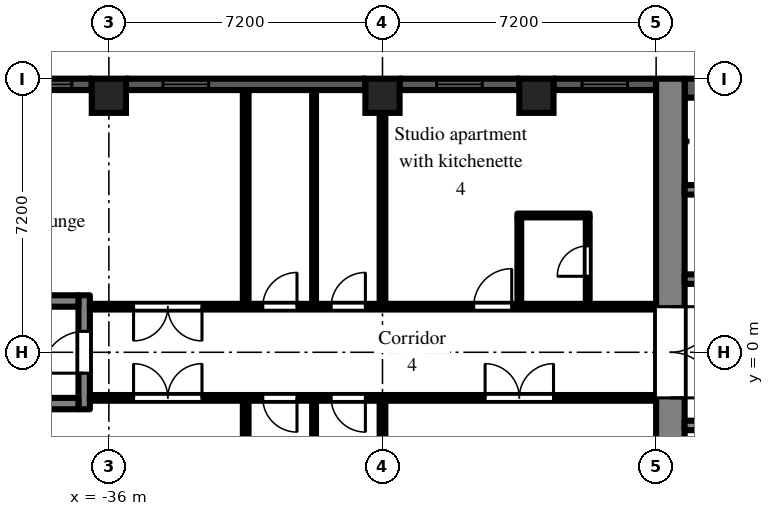
"""IFC4 building model, lengths in metres.
Left out: names, types, materials, properties, quantities, classifications, styles, units other than length and angle.
Written with IfcOpenShell. Run it as: python <this file> out.ifc"""

import sys

from ifc_helpers import new_model, si_unit, direction, frame, frame_2d, origin, origin_2d, place, context, subcontext, project, spatial, rectangle, extrude, element, fill, save


model = new_model("IFC4")
c1 = context("Model", 3, precision=1e-05, world=origin(), true_north=direction((0.0, 1.0)))
c2 = subcontext(c1, "Body", "Model", "MODEL_VIEW")
j1 = project(units=[si_unit("LENGTHUNIT", "METRE"), si_unit("PLANEANGLEUNIT", "RADIAN")], contexts=[c1])
p1 = place(None, origin())
s1 = spatial("IfcSite", under=j1, at=p1, CompositionType="ELEMENT")
p2 = place(p1, origin())
s2 = spatial("IfcBuilding", under=s1, at=p2, CompositionType="ELEMENT")
p3 = place(p2, frame((0.0, 0.0, 108.9)))
s3 = spatial("IfcBuildingStorey", under=s2, at=p3, CompositionType="ELEMENT", Elevation=108.9)
for number, where, z_axis, x_axis in (
    (1, (-36.0, 6.75, 0.0), (0.0, 0.0, 1.0), (1.0, 0.0, 0.0)),
    (2, (-28.8, 6.75, 0.0), (0.0, 0.0, 1.0), (1.0, 0.0, 0.0)),
    (3, (-24.75, 6.75, 0.0), (0.0, 0.0, 1.0), (1.0, 0.0, 0.0)),
):
    element("IfcColumn", number, at=place(p3, frame(where, z_axis=z_axis, x_axis=x_axis)), inside=s3, PredefinedType="COLUMN", context=c2, shape_type="SweptSolid", body=[
        extrude(rectangle(XDim=0.9, YDim=0.9, at=origin_2d()), origin(), (0.0, 0.0, 1.0), 3.0),
    ])
p4 = place(p3, frame((-21.6, 7.05, 0.0), z_axis=(0.0, 0.0, 1.0), x_axis=(-1.0, 0.0, 0.0)))
e4 = element("IfcWall", 4, at=p4, inside=s3, PredefinedType="SOLIDWALL", context=c2, shape_type="SweptSolid", body=[
    extrude(rectangle(XDim=2.7, YDim=0.3, at=frame_2d((1.35, 0.0))), origin(), (0.0, 0.0, 1.0), 2.2),
])
p5 = place(p4, frame((0.75, 0.0, 0.2)))
e5 = element("IfcOpeningElement", 5, at=p5, cuts=e4, PredefinedType="OPENING", context=c2, shape_type="SweptSolid", body=[
    extrude(rectangle(XDim=1.2, YDim=1.85, at=frame_2d((0.6, 0.925))), frame((0.0, 0.16, 0.0), z_axis=(0.0, -1.0, 0.0), x_axis=(1.0, 0.0, 0.0)), (0.0, 0.0, 1.0), 0.32),
])
p6 = place(p3, frame((-25.2, 7.05, 0.0), z_axis=(0.0, 0.0, 1.0), x_axis=(-1.0, 0.0, 0.0)))
e6 = element("IfcWall", 6, at=p6, inside=s3, PredefinedType="SOLIDWALL", context=c2, shape_type="SweptSolid", body=[
    extrude(rectangle(XDim=3.15, YDim=0.3, at=frame_2d((1.575, 0.0))), origin(), (0.0, 0.0, 1.0), 2.2),
])
p7 = place(p6, frame((0.975, 0.0, 0.2)))
e7 = element("IfcOpeningElement", 7, at=p7, cuts=e6, PredefinedType="OPENING", context=c2, shape_type="SweptSolid", body=[
    extrude(rectangle(XDim=1.2, YDim=1.85, at=frame_2d((0.6, 0.925))), frame((0.0, 0.16, 0.0), z_axis=(0.0, -1.0, 0.0), x_axis=(1.0, 0.0, 0.0)), (0.0, 0.0, 1.0), 0.32),
])
p8 = place(p3, frame((-29.25, 7.05, 0.0), z_axis=(0.0, 0.0, 1.0), x_axis=(-1.0, 0.0, 0.0)))
e8 = element("IfcWall", 8, at=p8, inside=s3, PredefinedType="SOLIDWALL", context=c2, shape_type="SweptSolid", body=[
    extrude(rectangle(XDim=6.3, YDim=0.3, at=frame_2d((3.15, 0.0))), origin(), (0.0, 0.0, 1.0), 2.2),
])
p9 = place(p8, frame((4.125, 0.0, 0.2)))
e9 = element("IfcOpeningElement", 9, at=p9, cuts=e8, PredefinedType="OPENING", context=c2, shape_type="SweptSolid", body=[
    extrude(rectangle(XDim=1.2, YDim=1.85, at=frame_2d((0.6, 0.925))), frame((0.0, 0.16, 0.0), z_axis=(0.0, -1.0, 0.0), x_axis=(1.0, 0.0, 0.0)), (0.0, 0.0, 1.0), 0.32),
])
p10 = place(p3, frame((-36.45, 7.05, 0.0), z_axis=(0.0, 0.0, 1.0), x_axis=(-1.0, 0.0, 0.0)))
e10 = element("IfcWall", 10, at=p10, inside=s3, PredefinedType="SOLIDWALL", context=c2, shape_type="SweptSolid", body=[
    extrude(rectangle(XDim=2.25, YDim=0.3, at=frame_2d((1.125, 0.0))), origin(), (0.0, 0.0, 1.0), 2.2),
])
p11 = place(p10, frame((0.525, 0.0, 0.2)))
e11 = element("IfcOpeningElement", 11, at=p11, cuts=e10, PredefinedType="OPENING", context=c2, shape_type="SweptSolid", body=[
    extrude(rectangle(XDim=1.2, YDim=1.85, at=frame_2d((0.6, 0.925))), frame((0.0, 0.16, 0.0), z_axis=(0.0, -1.0, 0.0), x_axis=(1.0, 0.0, 0.0)), (0.0, 0.0, 1.0), 0.32),
])
p12 = place(p3, frame((-21.225, -7.2, 0.0), z_axis=(0.0, 0.0, 1.0), x_axis=(0.0, 1.0, 0.0)))
e12 = element("IfcWall", 12, at=p12, inside=s3, PredefinedType="SHEAR", context=c2, shape_type="SweptSolid", body=[
    extrude(rectangle(XDim=14.4, YDim=0.75, at=frame_2d((7.2, 0.0))), origin(), (0.0, 0.0, 1.0), 2.55),
])
p13 = place(p12, frame((6.0, 0.0, 0.0)))
e13 = element("IfcOpeningElement", 13, at=p13, cuts=e12, PredefinedType="OPENING", context=c2, shape_type="SweptSolid", body=[
    extrude(rectangle(XDim=2.4, YDim=2.2, at=frame_2d((1.2, 1.1))), frame((0.0, 0.385, 0.0), z_axis=(0.0, -1.0, 0.0), x_axis=(1.0, 0.0, 0.0)), (0.0, 0.0, 1.0), 0.77),
])
p14 = place(p3, frame((-7.9, 6.95, 0.0), z_axis=(0.0, 0.0, 1.0), x_axis=(-1.0, 0.0, 0.0)))
e14 = element("IfcWall", 14, at=p14, inside=s3, PredefinedType="SHEAR", context=c2, shape_type="SweptSolid", body=[
    extrude(rectangle(XDim=12.95, YDim=0.5, at=frame_2d((6.475, 0.0))), origin(), (0.0, 0.0, 1.0), 2.55),
])
p15 = place(p3, frame((-7.9, 1.925, 0.0), z_axis=(0.0, 0.0, 1.0), x_axis=(-1.0, 0.0, 0.0)))
e15 = element("IfcWall", 15, at=p15, inside=s3, PredefinedType="SHEAR", context=c2, shape_type="SweptSolid", body=[
    extrude(rectangle(XDim=12.95, YDim=0.25, at=frame_2d((6.475, 0.0))), origin(), (0.0, 0.0, 1.0), 2.55),
])
p16 = place(p15, frame((0.525, 0.0, 0.0)))
e16 = element("IfcOpeningElement", 16, at=p16, cuts=e15, PredefinedType="OPENING", context=c2, shape_type="SweptSolid", body=[
    extrude(rectangle(XDim=0.9, YDim=2.1, at=frame_2d((0.45, 1.05))), frame((0.0, 0.135, 0.0), z_axis=(0.0, -1.0, 0.0), x_axis=(1.0, 0.0, 0.0)), (0.0, 0.0, 1.0), 0.27),
])
p17 = place(p15, frame((2.625, 0.0, 0.0)))
e17 = element("IfcOpeningElement", 17, at=p17, cuts=e15, PredefinedType="OPENING", context=c2, shape_type="SweptSolid", body=[
    extrude(rectangle(XDim=1.1, YDim=2.1, at=frame_2d((0.55, 1.05))), frame((0.0, 0.135, 0.0), z_axis=(0.0, -1.0, 0.0), x_axis=(1.0, 0.0, 0.0)), (0.0, 0.0, 1.0), 0.27),
])
p18 = place(p15, frame((4.925, 0.0, 0.0)))
e18 = element("IfcOpeningElement", 18, at=p18, cuts=e15, PredefinedType="OPENING", context=c2, shape_type="SweptSolid", body=[
    extrude(rectangle(XDim=0.9, YDim=2.1, at=frame_2d((0.45, 1.05))), frame((0.0, 0.135, 0.0), z_axis=(0.0, -1.0, 0.0), x_axis=(1.0, 0.0, 0.0)), (0.0, 0.0, 1.0), 0.27),
])
p19 = place(p15, frame((8.225, 0.0, 0.0)))
e19 = element("IfcOpeningElement", 19, at=p19, cuts=e15, PredefinedType="OPENING", context=c2, shape_type="SweptSolid", body=[
    extrude(rectangle(XDim=0.9, YDim=2.1, at=frame_2d((0.45, 1.05))), frame((0.0, 0.135, 0.0), z_axis=(0.0, -1.0, 0.0), x_axis=(1.0, 0.0, 0.0)), (0.0, 0.0, 1.0), 0.27),
])
p20 = place(p3, frame((-12.3, 4.275, 0.0), z_axis=(0.0, 0.0, 1.0), x_axis=(-1.0, 0.0, 0.0)))
e20 = element("IfcWall", 20, at=p20, inside=s3, PredefinedType="SHEAR", context=c2, shape_type="SweptSolid", body=[
    extrude(rectangle(XDim=8.55, YDim=0.25, at=frame_2d((4.275, 0.0))), origin(), (0.0, 0.0, 1.0), 2.55),
])
p21 = place(p3, frame((-7.9, -1.925, 0.0), z_axis=(0.0, 0.0, 1.0), x_axis=(-1.0, 0.0, 0.0)))
e21 = element("IfcWall", 21, at=p21, inside=s3, PredefinedType="SHEAR", context=c2, shape_type="SweptSolid", body=[
    extrude(rectangle(XDim=12.95, YDim=0.25, at=frame_2d((6.475, 0.0))), origin(), (0.0, 0.0, 1.0), 2.55),
])
p22 = place(p21, frame((4.825, 0.0, 0.0)))
e22 = element("IfcOpeningElement", 22, at=p22, cuts=e21, PredefinedType="OPENING", context=c2, shape_type="SweptSolid", body=[
    extrude(rectangle(XDim=1.1, YDim=2.1, at=frame_2d((0.55, 1.05))), frame((0.0, 0.135, 0.0), z_axis=(0.0, -1.0, 0.0), x_axis=(1.0, 0.0, 0.0)), (0.0, 0.0, 1.0), 0.27),
])
p23 = place(p21, frame((7.025, 0.0, 0.0)))
e23 = element("IfcOpeningElement", 23, at=p23, cuts=e21, PredefinedType="OPENING", context=c2, shape_type="SweptSolid", body=[
    extrude(rectangle(XDim=1.1, YDim=2.1, at=frame_2d((0.55, 1.05))), frame((0.0, 0.135, 0.0), z_axis=(0.0, -1.0, 0.0), x_axis=(1.0, 0.0, 0.0)), (0.0, 0.0, 1.0), 0.27),
])
p24 = place(p21, frame((9.225, 0.0, 0.0)))
e24 = element("IfcOpeningElement", 24, at=p24, cuts=e21, PredefinedType="OPENING", context=c2, shape_type="SweptSolid", body=[
    extrude(rectangle(XDim=1.1, YDim=2.1, at=frame_2d((0.55, 1.05))), frame((0.0, 0.135, 0.0), z_axis=(0.0, -1.0, 0.0), x_axis=(1.0, 0.0, 0.0)), (0.0, 0.0, 1.0), 0.27),
])
p25 = place(p21, frame((0.525, 0.0, 0.0)))
e25 = element("IfcOpeningElement", 25, at=p25, cuts=e21, PredefinedType="OPENING", context=c2, shape_type="SweptSolid", body=[
    extrude(rectangle(XDim=0.9, YDim=2.1, at=frame_2d((0.45, 1.05))), frame((0.0, 0.135, 0.0), z_axis=(0.0, -1.0, 0.0), x_axis=(1.0, 0.0, 0.0)), (0.0, 0.0, 1.0), 0.27),
])
p26 = place(p21, frame((2.625, 0.0, 0.0)))
e26 = element("IfcOpeningElement", 26, at=p26, cuts=e21, PredefinedType="OPENING", context=c2, shape_type="SweptSolid", body=[
    extrude(rectangle(XDim=1.1, YDim=2.1, at=frame_2d((0.55, 1.05))), frame((0.0, 0.135, 0.0), z_axis=(0.0, -1.0, 0.0), x_axis=(1.0, 0.0, 0.0)), (0.0, 0.0, 1.0), 0.27),
])
p27 = place(p3, frame((-36.65, -1.5, 0.0), z_axis=(0.0, 0.0, 1.0), x_axis=(0.0, 1.0, 0.0)))
e27 = element("IfcWall", 27, at=p27, inside=s3, PredefinedType="SHEAR", context=c2, shape_type="SweptSolid", body=[
    extrude(rectangle(XDim=3.0, YDim=0.3, at=frame_2d((1.5, 0.0))), origin(), (0.0, 0.0, 1.0), 2.55),
])
p28 = place(p27, frame((0.95, 0.0, 0.0)))
e28 = element("IfcOpeningElement", 28, at=p28, cuts=e27, PredefinedType="OPENING", context=c2, shape_type="SweptSolid", body=[
    extrude(rectangle(XDim=1.1, YDim=2.1, at=frame_2d((0.55, 1.05))), frame((0.0, 0.16, 0.0), z_axis=(0.0, -1.0, 0.0), x_axis=(1.0, 0.0, 0.0)), (0.0, 0.0, 1.0), 0.32),
])
for number, where, z_axis, x_axis in (
    (29, (-36.8, -1.35, 0.0), (0.0, 0.0, 1.0), (-1.0, 0.0, 0.0)),
    (30, (-36.8, 1.35, 0.0), (0.0, 0.0, 1.0), (-1.0, 0.0, 0.0)),
):
    element("IfcWall", number, at=place(p3, frame(where, z_axis=z_axis, x_axis=x_axis)), inside=s3, PredefinedType="SHEAR", context=c2, shape_type="SweptSolid", body=[
        extrude(rectangle(XDim=5.8, YDim=0.3, at=frame_2d((2.9, 0.0))), origin(), (0.0, 0.0, 1.0), 2.55),
    ])
p29 = place(p3, frame((-36.5, -1.2, 0.0), z_axis=(0.0, 0.0, 1.0), x_axis=(1.0, 0.0, 0.0)))
e31 = element("IfcWall", 31, at=p29, inside=s3, PredefinedType="PARTITIONING", context=c2, shape_type="SweptSolid", body=[
    extrude(rectangle(XDim=14.9, YDim=0.15, at=frame_2d((7.45, 0.0))), origin(), (0.0, 0.0, 1.0), 2.55),
])
p30 = place(p29, frame((10.4, 0.0, 0.0)))
e32 = element("IfcOpeningElement", 32, at=p30, cuts=e31, PredefinedType="OPENING", context=c2, shape_type="SweptSolid", body=[
    extrude(rectangle(XDim=1.8, YDim=2.1, at=frame_2d((0.9, 1.05))), frame((0.0, 0.085, 0.0), z_axis=(0.0, -1.0, 0.0), x_axis=(1.0, 0.0, 0.0)), (0.0, 0.0, 1.0), 0.17),
])
p31 = place(p29, frame((6.35, 0.0, 0.0)))
e33 = element("IfcOpeningElement", 33, at=p31, cuts=e31, PredefinedType="OPENING", context=c2, shape_type="SweptSolid", body=[
    extrude(rectangle(XDim=0.9, YDim=2.1, at=frame_2d((0.45, 1.05))), frame((0.0, 0.085, 0.0), z_axis=(0.0, -1.0, 0.0), x_axis=(1.0, 0.0, 0.0)), (0.0, 0.0, 1.0), 0.17),
])
p32 = place(p29, frame((4.55, 0.0, 0.0)))
e34 = element("IfcOpeningElement", 34, at=p32, cuts=e31, PredefinedType="OPENING", context=c2, shape_type="SweptSolid", body=[
    extrude(rectangle(XDim=0.9, YDim=2.1, at=frame_2d((0.45, 1.05))), frame((0.0, 0.085, 0.0), z_axis=(0.0, -1.0, 0.0), x_axis=(1.0, 0.0, 0.0)), (0.0, 0.0, 1.0), 0.17),
])
p33 = place(p29, frame((1.15, 0.0, 0.0)))
e35 = element("IfcOpeningElement", 35, at=p33, cuts=e31, PredefinedType="OPENING", context=c2, shape_type="SweptSolid", body=[
    extrude(rectangle(XDim=1.8, YDim=2.1, at=frame_2d((0.9, 1.05))), frame((0.0, 0.085, 0.0), z_axis=(0.0, -1.0, 0.0), x_axis=(1.0, 0.0, 0.0)), (0.0, 0.0, 1.0), 0.17),
])
p34 = place(p3, frame((-36.5, 1.2, 0.0), z_axis=(0.0, 0.0, 1.0), x_axis=(1.0, 0.0, 0.0)))
e36 = element("IfcWall", 36, at=p34, inside=s3, PredefinedType="PARTITIONING", context=c2, shape_type="SweptSolid", body=[
    extrude(rectangle(XDim=14.9, YDim=0.15, at=frame_2d((7.45, 0.0))), origin(), (0.0, 0.0, 1.0), 2.55),
])
p35 = place(p34, frame((10.1, 0.0, 0.0)))
e37 = element("IfcOpeningElement", 37, at=p35, cuts=e36, PredefinedType="OPENING", context=c2, shape_type="SweptSolid", body=[
    extrude(rectangle(XDim=1.0, YDim=2.1, at=frame_2d((0.5, 1.05))), frame((0.0, 0.085, 0.0), z_axis=(0.0, -1.0, 0.0), x_axis=(1.0, 0.0, 0.0)), (0.0, 0.0, 1.0), 0.17),
])
p36 = place(p34, frame((6.35, 0.0, 0.0)))
e38 = element("IfcOpeningElement", 38, at=p36, cuts=e36, PredefinedType="OPENING", context=c2, shape_type="SweptSolid", body=[
    extrude(rectangle(XDim=0.9, YDim=2.1, at=frame_2d((0.45, 1.05))), frame((0.0, 0.085, 0.0), z_axis=(0.0, -1.0, 0.0), x_axis=(1.0, 0.0, 0.0)), (0.0, 0.0, 1.0), 0.17),
])
p37 = place(p34, frame((4.55, 0.0, 0.0)))
e39 = element("IfcOpeningElement", 39, at=p37, cuts=e36, PredefinedType="OPENING", context=c2, shape_type="SweptSolid", body=[
    extrude(rectangle(XDim=0.9, YDim=2.1, at=frame_2d((0.45, 1.05))), frame((0.0, 0.085, 0.0), z_axis=(0.0, -1.0, 0.0), x_axis=(1.0, 0.0, 0.0)), (0.0, 0.0, 1.0), 0.17),
])
p38 = place(p34, frame((1.15, 0.0, 0.0)))
e40 = element("IfcOpeningElement", 40, at=p38, cuts=e36, PredefinedType="OPENING", context=c2, shape_type="SweptSolid", body=[
    extrude(rectangle(XDim=1.8, YDim=2.1, at=frame_2d((0.9, 1.05))), frame((0.0, 0.085, 0.0), z_axis=(0.0, -1.0, 0.0), x_axis=(1.0, 0.0, 0.0)), (0.0, 0.0, 1.0), 0.17),
])
for number, where, z_axis, x_axis in (
    (41, (-32.4, -6.9, 0.0), (0.0, 0.0, 1.0), (0.0, 1.0, 0.0)),
    (42, (-32.4, 1.275, 0.0), (0.0, 0.0, 1.0), (0.0, 1.0, 0.0)),
):
    element("IfcWall", number, at=place(p3, frame(where, z_axis=z_axis, x_axis=x_axis)), inside=s3, PredefinedType="PARTITIONING", context=c2, shape_type="SweptSolid", body=[
        extrude(rectangle(XDim=5.625, YDim=0.15, at=frame_2d((2.812, 0.0))), origin(), (0.0, 0.0, 1.0), 2.55),
    ])
for number, where, z_axis, x_axis in (
    (43, (-30.6, -6.9, 0.0), (0.0, 0.0, 1.0), (0.0, 1.0, 0.0)),
    (44, (-30.6, 1.275, 0.0), (0.0, 0.0, 1.0), (0.0, 1.0, 0.0)),
):
    element("IfcWall", number, at=place(p3, frame(where, z_axis=z_axis, x_axis=x_axis)), inside=s3, PredefinedType="PARTITIONING", context=c2, shape_type="SweptSolid", body=[
        extrude(rectangle(XDim=5.625, YDim=0.1, at=frame_2d((2.812, 0.0))), origin(), (0.0, 0.0, 1.0), 2.55),
    ])
for number, where, z_axis, x_axis in (
    (45, (-28.8, -6.9, 0.0), (0.0, 0.0, 1.0), (0.0, 1.0, 0.0)),
    (46, (-28.8, 1.275, 0.0), (0.0, 0.0, 1.0), (0.0, 1.0, 0.0)),
):
    element("IfcWall", number, at=place(p3, frame(where, z_axis=z_axis, x_axis=x_axis)), inside=s3, PredefinedType="PARTITIONING", context=c2, shape_type="SweptSolid", body=[
        extrude(rectangle(XDim=5.625, YDim=0.15, at=frame_2d((2.812, 0.0))), origin(), (0.0, 0.0, 1.0), 2.55),
    ])
p39 = place(p3, frame((-25.2, 1.275, 0.0), z_axis=(0.0, 0.0, 1.0), x_axis=(0.0, 1.0, 0.0)))
e47 = element("IfcWall", 47, at=p39, inside=s3, PredefinedType="PARTITIONING", context=c2, shape_type="SweptSolid", body=[
    extrude(rectangle(XDim=2.275, YDim=0.1, at=frame_2d((1.138, 0.0))), origin(), (0.0, 0.0, 1.0), 2.55),
])
p40 = place(p3, frame((-25.25, 3.6, 0.0), z_axis=(0.0, 0.0, 1.0), x_axis=(1.0, 0.0, 0.0)))
e48 = element("IfcWall", 48, at=p40, inside=s3, PredefinedType="PARTITIONING", context=c2, shape_type="SweptSolid", body=[
    extrude(rectangle(XDim=1.9, YDim=0.1, at=frame_2d((0.95, 0.0))), origin(), (0.0, 0.0, 1.0), 2.55),
])
p41 = place(p3, frame((-23.4, 1.275, 0.0), z_axis=(0.0, 0.0, 1.0), x_axis=(0.0, 1.0, 0.0)))
e49 = element("IfcWall", 49, at=p41, inside=s3, PredefinedType="PARTITIONING", context=c2, shape_type="SweptSolid", body=[
    extrude(rectangle(XDim=2.275, YDim=0.1, at=frame_2d((1.138, 0.0))), origin(), (0.0, 0.0, 1.0), 2.55),
])
p42 = place(p41, frame((0.725, 0.0, 0.0)))
e50 = element("IfcOpeningElement", 50, at=p42, cuts=e49, PredefinedType="OPENING", context=c2, shape_type="SweptSolid", body=[
    extrude(rectangle(XDim=0.8, YDim=2.1, at=frame_2d((0.4, 1.05))), frame((0.0, 0.06, 0.0), z_axis=(0.0, -1.0, 0.0), x_axis=(1.0, 0.0, 0.0)), (0.0, 0.0, 1.0), 0.12),
])
p43 = place(p5, origin())
e51 = element("IfcWindow", 51, at=p43, inside=s3, PartitioningType="SINGLE_PANEL", PredefinedType="WINDOW", context=c2, shape_type="SweptSolid", body=[
    extrude(rectangle(XDim=1.2, YDim=1.85, at=frame_2d((0.6, 0.925))), frame((0.0, 0.03, 0.0), z_axis=(0.0, -1.0, 0.0), x_axis=(1.0, 0.0, 0.0)), (0.0, 0.0, 1.0), 0.06),
])
fill(e5, e51)
p44 = place(p7, origin())
e52 = element("IfcWindow", 52, at=p44, inside=s3, PartitioningType="SINGLE_PANEL", PredefinedType="WINDOW", context=c2, shape_type="SweptSolid", body=[
    extrude(rectangle(XDim=1.2, YDim=1.85, at=frame_2d((0.6, 0.925))), frame((0.0, 0.03, 0.0), z_axis=(0.0, -1.0, 0.0), x_axis=(1.0, 0.0, 0.0)), (0.0, 0.0, 1.0), 0.06),
])
fill(e7, e52)
p45 = place(p9, origin())
e53 = element("IfcWindow", 53, at=p45, inside=s3, PartitioningType="SINGLE_PANEL", PredefinedType="WINDOW", context=c2, shape_type="SweptSolid", body=[
    extrude(rectangle(XDim=1.2, YDim=1.85, at=frame_2d((0.6, 0.925))), frame((0.0, 0.03, 0.0), z_axis=(0.0, -1.0, 0.0), x_axis=(1.0, 0.0, 0.0)), (0.0, 0.0, 1.0), 0.06),
])
fill(e9, e53)
p46 = place(p11, origin())
e54 = element("IfcWindow", 54, at=p46, inside=s3, PartitioningType="SINGLE_PANEL", PredefinedType="WINDOW", context=c2, shape_type="SweptSolid", body=[
    extrude(rectangle(XDim=1.2, YDim=1.85, at=frame_2d((0.6, 0.925))), frame((0.0, 0.03, 0.0), z_axis=(0.0, -1.0, 0.0), x_axis=(1.0, 0.0, 0.0)), (0.0, 0.0, 1.0), 0.06),
])
fill(e11, e54)
p47 = place(p13, frame((2.4, 0.0, 0.0), z_axis=(0.0, 0.0, 1.0), x_axis=(-1.0, 0.0, 0.0)))
e55 = element("IfcDoor", 55, at=p47, inside=s3, OperationType="DOUBLE_DOOR_DOUBLE_SWING", PredefinedType="DOOR", context=c2, shape_type="SweptSolid", body=[
    extrude(rectangle(XDim=2.4, YDim=2.2, at=frame_2d((1.2, 1.1))), frame((0.0, 0.025, 0.0), z_axis=(0.0, -1.0, 0.0), x_axis=(1.0, 0.0, 0.0)), (0.0, 0.0, 1.0), 0.05),
])
fill(e13, e55)
p48 = place(p28, origin())
e56 = element("IfcDoor", 56, at=p48, inside=s3, OperationType="SINGLE_SWING_LEFT", PredefinedType="DOOR", context=c2, shape_type="SweptSolid", body=[
    extrude(rectangle(XDim=1.1, YDim=2.1, at=frame_2d((0.55, 1.05))), frame((0.0, 0.025, 0.0), z_axis=(0.0, -1.0, 0.0), x_axis=(1.0, 0.0, 0.0)), (0.0, 0.0, 1.0), 0.05),
])
fill(e28, e56)
p49 = place(p30, origin())
e57 = element("IfcDoor", 57, at=p49, inside=s3, OperationType="DOUBLE_DOOR_DOUBLE_SWING", PredefinedType="DOOR", context=c2, shape_type="SweptSolid", body=[
    extrude(rectangle(XDim=1.8, YDim=2.1, at=frame_2d((0.9, 1.05))), frame((0.0, 0.025, 0.0), z_axis=(0.0, -1.0, 0.0), x_axis=(1.0, 0.0, 0.0)), (0.0, 0.0, 1.0), 0.05),
])
fill(e32, e57)
p50 = place(p31, frame((0.9, 0.0, 0.0), z_axis=(0.0, 0.0, 1.0), x_axis=(-1.0, 0.0, 0.0)))
e58 = element("IfcDoor", 58, at=p50, inside=s3, OperationType="SINGLE_SWING_LEFT", PredefinedType="DOOR", context=c2, shape_type="SweptSolid", body=[
    extrude(rectangle(XDim=0.9, YDim=2.1, at=frame_2d((0.45, 1.05))), frame((0.0, 0.025, 0.0), z_axis=(0.0, -1.0, 0.0), x_axis=(1.0, 0.0, 0.0)), (0.0, 0.0, 1.0), 0.05),
])
fill(e33, e58)
p51 = place(p32, frame((0.9, 0.0, 0.0), z_axis=(0.0, 0.0, 1.0), x_axis=(-1.0, 0.0, 0.0)))
e59 = element("IfcDoor", 59, at=p51, inside=s3, OperationType="SINGLE_SWING_LEFT", PredefinedType="DOOR", context=c2, shape_type="SweptSolid", body=[
    extrude(rectangle(XDim=0.9, YDim=2.1, at=frame_2d((0.45, 1.05))), frame((0.0, 0.025, 0.0), z_axis=(0.0, -1.0, 0.0), x_axis=(1.0, 0.0, 0.0)), (0.0, 0.0, 1.0), 0.05),
])
fill(e34, e59)
p52 = place(p33, origin())
e60 = element("IfcDoor", 60, at=p52, inside=s3, OperationType="DOUBLE_DOOR_DOUBLE_SWING", PredefinedType="DOOR", context=c2, shape_type="SweptSolid", body=[
    extrude(rectangle(XDim=1.8, YDim=2.1, at=frame_2d((0.9, 1.05))), frame((0.0, 0.025, 0.0), z_axis=(0.0, -1.0, 0.0), x_axis=(1.0, 0.0, 0.0)), (0.0, 0.0, 1.0), 0.05),
])
fill(e35, e60)
p53 = place(p42, origin())
e61 = element("IfcDoor", 61, at=p53, inside=s3, OperationType="SINGLE_SWING_LEFT", PredefinedType="DOOR", context=c2, shape_type="SweptSolid", body=[
    extrude(rectangle(XDim=0.8, YDim=2.1, at=frame_2d((0.4, 1.05))), frame((0.0, 0.025, 0.0), z_axis=(0.0, -1.0, 0.0), x_axis=(1.0, 0.0, 0.0)), (0.0, 0.0, 1.0), 0.05),
])
fill(e50, e61)
p54 = place(p35, origin())
e62 = element("IfcDoor", 62, at=p54, inside=s3, OperationType="SINGLE_SWING_RIGHT", PredefinedType="DOOR", context=c2, shape_type="SweptSolid", body=[
    extrude(rectangle(XDim=1.0, YDim=2.1, at=frame_2d((0.5, 1.05))), frame((0.0, 0.025, 0.0), z_axis=(0.0, -1.0, 0.0), x_axis=(1.0, 0.0, 0.0)), (0.0, 0.0, 1.0), 0.05),
])
fill(e37, e62)
p55 = place(p36, origin())
e63 = element("IfcDoor", 63, at=p55, inside=s3, OperationType="SINGLE_SWING_RIGHT", PredefinedType="DOOR", context=c2, shape_type="SweptSolid", body=[
    extrude(rectangle(XDim=0.9, YDim=2.1, at=frame_2d((0.45, 1.05))), frame((0.0, 0.025, 0.0), z_axis=(0.0, -1.0, 0.0), x_axis=(1.0, 0.0, 0.0)), (0.0, 0.0, 1.0), 0.05),
])
fill(e38, e63)
p56 = place(p37, origin())
e64 = element("IfcDoor", 64, at=p56, inside=s3, OperationType="SINGLE_SWING_RIGHT", PredefinedType="DOOR", context=c2, shape_type="SweptSolid", body=[
    extrude(rectangle(XDim=0.9, YDim=2.1, at=frame_2d((0.45, 1.05))), frame((0.0, 0.025, 0.0), z_axis=(0.0, -1.0, 0.0), x_axis=(1.0, 0.0, 0.0)), (0.0, 0.0, 1.0), 0.05),
])
fill(e39, e64)
p57 = place(p38, frame((1.8, 0.0, 0.0), z_axis=(0.0, 0.0, 1.0), x_axis=(-1.0, 0.0, 0.0)))
e65 = element("IfcDoor", 65, at=p57, inside=s3, OperationType="DOUBLE_DOOR_DOUBLE_SWING", PredefinedType="DOOR", context=c2, shape_type="SweptSolid", body=[
    extrude(rectangle(XDim=1.8, YDim=2.1, at=frame_2d((0.9, 1.05))), frame((0.0, 0.025, 0.0), z_axis=(0.0, -1.0, 0.0), x_axis=(1.0, 0.0, 0.0)), (0.0, 0.0, 1.0), 0.05),
])
fill(e40, e65)
save(model, sys.argv[1])
